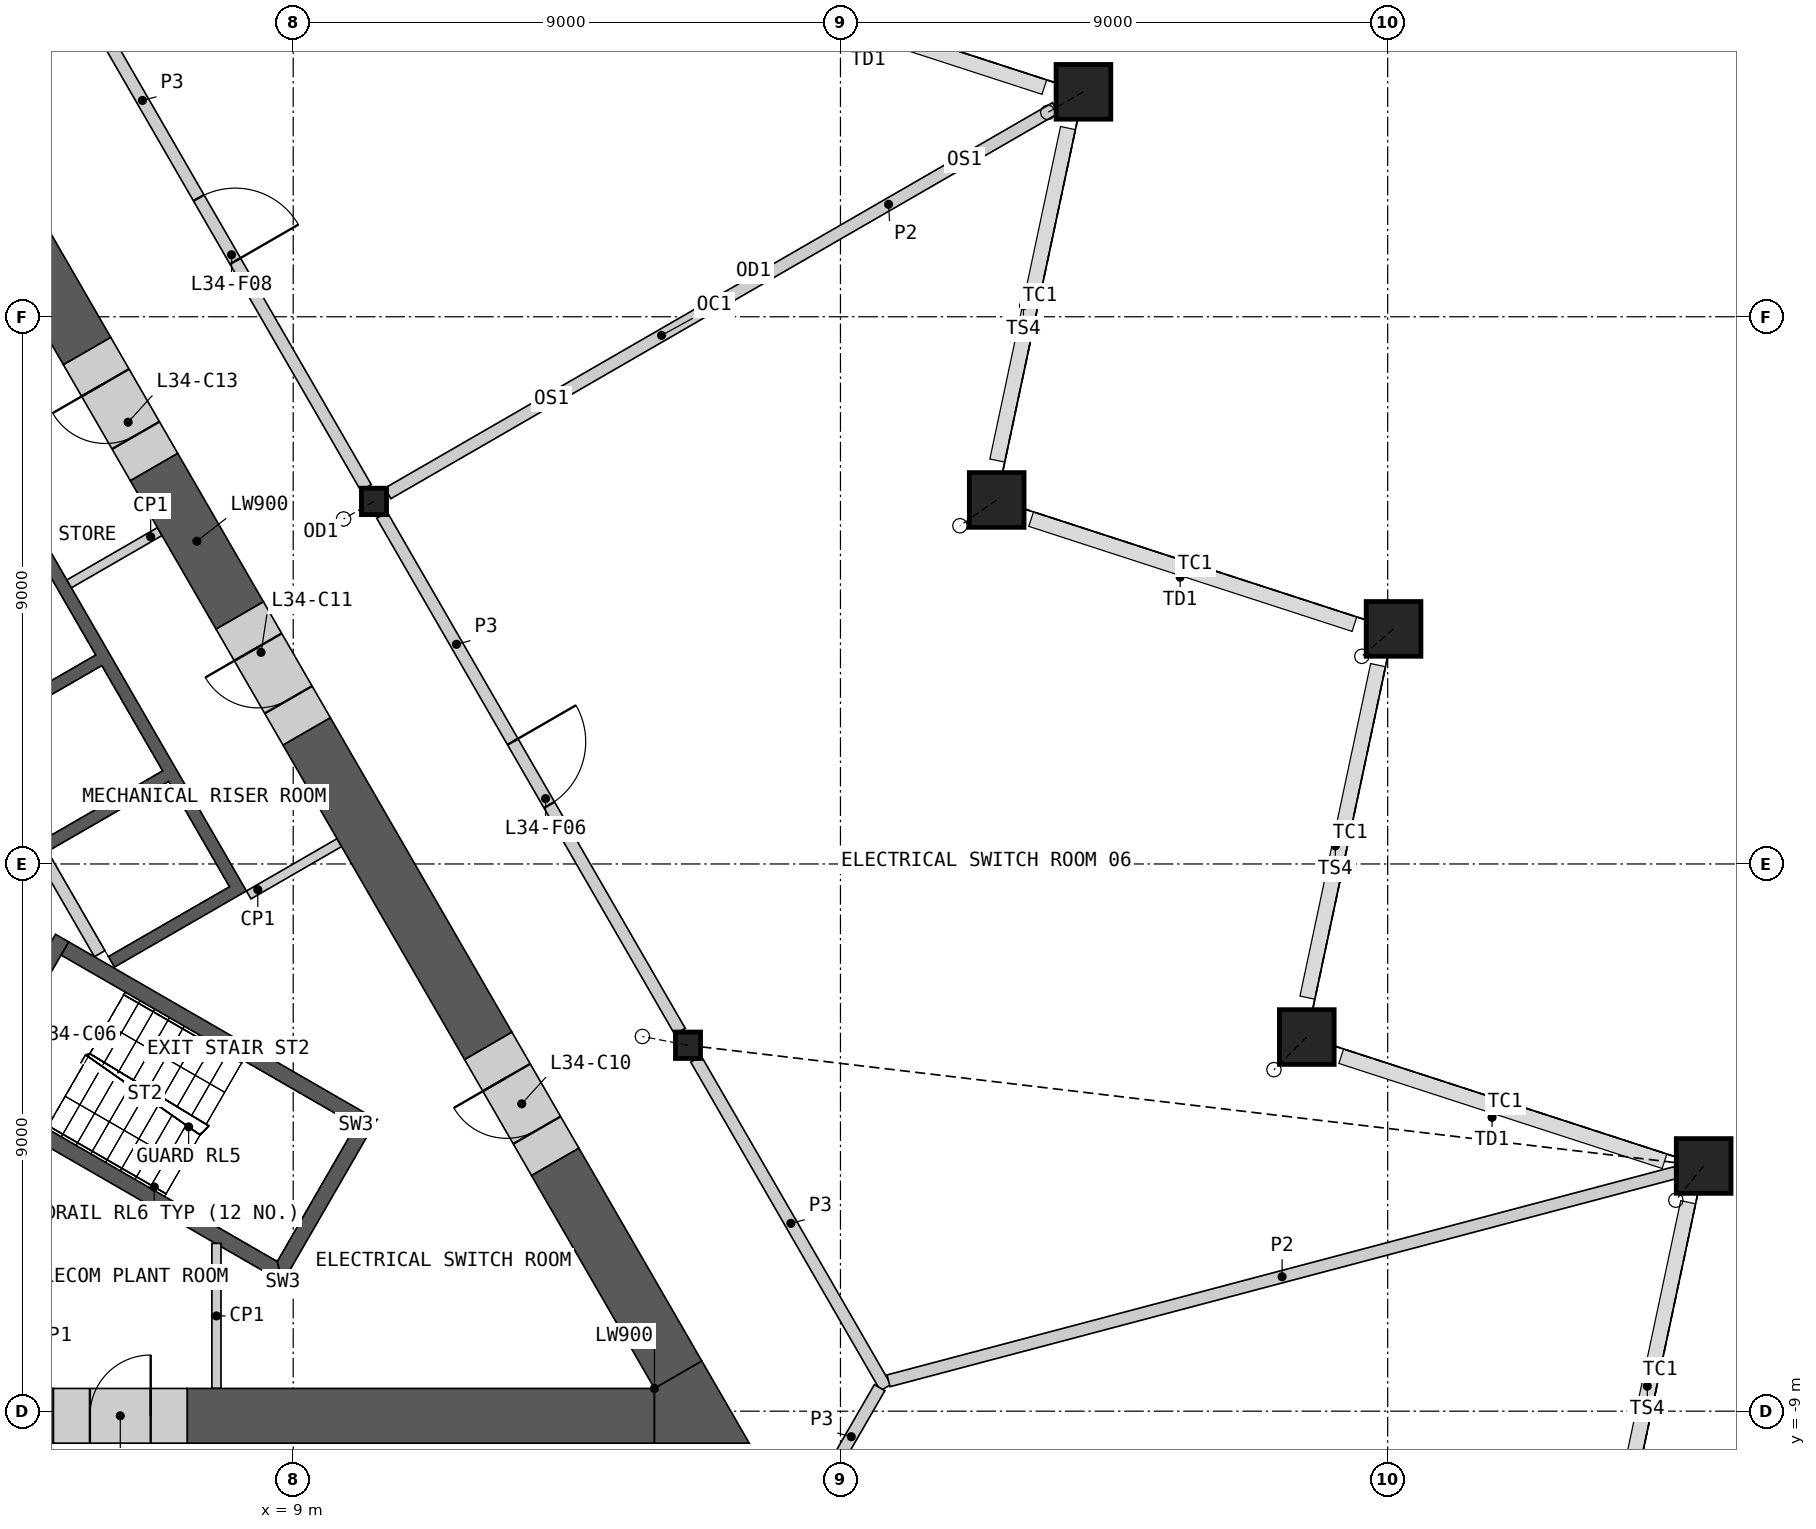
"""IFC4 building model, lengths in metres.
Left out: names, types, materials, properties, quantities, classifications, styles, units other than length and angle.
Written with IfcOpenShell. Run it as: python <this file> out.ifc"""

import sys

from ifc_helpers import new_model, si_unit, direction, frame, frame_2d, origin, origin_2d, place, context, subcontext, project, spatial, polyline, rectangle, hollow_rectangle, i_section, outline, extrude, element, fill, save


model = new_model("IFC4")
c1 = context("Model", 3, precision=1e-05, world=origin(), true_north=direction((0.0, 1.0)))
c2 = subcontext(c1, "Body", "Model", "MODEL_VIEW")
j1 = project(units=[si_unit("LENGTHUNIT", "METRE"), si_unit("PLANEANGLEUNIT", "RADIAN")], contexts=[c1])
p1 = place(None, origin())
s1 = spatial("IfcSite", under=j1, at=p1, CompositionType="ELEMENT")
p2 = place(p1, origin())
s2 = spatial("IfcBuilding", under=s1, at=p2, CompositionType="ELEMENT")
p3 = place(p2, frame((0.0, 0.0, 164.2)))
s3 = spatial("IfcBuildingStorey", under=s2, at=p3, CompositionType="ELEMENT", Elevation=164.2)
p4 = place(p3, frame((32.196, -4.967, 0.0), z_axis=(-0.090507303602, -0.111479097389, 0.989636720641), x_axis=(0.776350696847, -0.630301194276, 0.0)))
e1 = element("IfcColumn", 1, at=p4, inside=s3, PredefinedType="COLUMN", context=c2, shape_type="SweptSolid", body=[
    extrude(hollow_rectangle(XDim=0.9, YDim=0.9, WallThickness=0.06, at=origin_2d()), frame((0.0, 0.0, 0.065)), (0.0, 0.0, 1.0), 4.922),
])
p5 = place(p3, frame((25.669, -2.846, 0.0), z_axis=(-0.106777681535, -0.106053601417, 0.988610722354), x_axis=(0.70469703233, -0.709508345705, 0.0)))
e2 = element("IfcColumn", 2, at=p5, inside=s3, PredefinedType="COLUMN", context=c2, shape_type="SweptSolid", body=[
    extrude(hollow_rectangle(XDim=0.9, YDim=0.9, WallThickness=0.06, at=origin_2d()), frame((0.0, 0.0, 0.069)), (0.0, 0.0, 1.0), 4.921),
])
p6 = place(p3, frame((27.096, 3.866, 0.0), z_axis=(-0.103415089439, -0.089339415432, 0.990617881994), x_axis=(0.653730443992, -0.756727498243, 0.0)))
e3 = element("IfcColumn", 3, at=p6, inside=s3, PredefinedType="COLUMN", context=c2, shape_type="SweptSolid", body=[
    extrude(hollow_rectangle(XDim=0.9, YDim=0.9, WallThickness=0.06, at=origin_2d()), frame((0.0, 0.0, 0.062)), (0.0, 0.0, 1.0), 4.923),
])
p7 = place(p3, frame((20.57, 5.987, 0.0), z_axis=(-0.119696450413, -0.083903444055, 0.98925879922), x_axis=(0.573994494418, -0.81885915784, 0.0)))
e4 = element("IfcColumn", 4, at=p7, inside=s3, PredefinedType="COLUMN", context=c2, shape_type="SweptSolid", body=[
    extrude(hollow_rectangle(XDim=0.9, YDim=0.9, WallThickness=0.06, at=origin_2d()), frame((0.0, 0.0, 0.066)), (0.0, 0.0, 1.0), 4.921),
])
p8 = place(p3, frame((21.996, 12.699, 0.0), z_axis=(-0.116319547646, -0.067111153322, 0.990941903411), x_axis=(0.499743247872, -0.866173588957, 0.0)))
e5 = element("IfcColumn", 5, at=p8, inside=s3, PredefinedType="COLUMN", context=c2, shape_type="SweptSolid", body=[
    extrude(hollow_rectangle(XDim=0.9, YDim=0.9, WallThickness=0.06, at=origin_2d()), frame((0.0, 0.0, 0.061)), (0.0, 0.0, 1.0), 4.924),
])
p9 = place(p3, frame((15.493, -2.982, 0.0), z_axis=(-0.148279879283, 0.028574768404, 0.988532528555), x_axis=(-0.189226752312, -0.981933417401, 0.0)))
e6 = element("IfcColumn", 6, at=p9, inside=s3, PredefinedType="COLUMN", context=c2, shape_type="SweptSolid", body=[
    extrude(i_section(OverallWidth=0.412, OverallDepth=0.435, WebThickness=0.036, FlangeThickness=0.057, at=origin_2d()), frame((0.0, 0.0, 0.033)), (0.0, 0.0, 1.0), 4.992),
])
p10 = place(p3, frame((10.328, 5.963, 0.0), z_axis=(-0.099340040995, -0.057333949442, 0.993400409954), x_axis=(0.499868889286, -0.866101087359, 0.0)))
e7 = element("IfcColumn", 7, at=p10, inside=s3, PredefinedType="COLUMN", context=c2, shape_type="SweptSolid", body=[
    extrude(i_section(OverallWidth=0.412, OverallDepth=0.435, WebThickness=0.036, FlangeThickness=0.057, at=origin_2d()), frame((0.0, 0.0, 0.025)), (0.0, 0.0, 1.0), 4.983),
])
p11 = place(p3, origin())
e8 = element("IfcWall", 8, at=p11, inside=s3, PredefinedType="SHEAR", context=c2, shape_type="SweptSolid", body=[
    extrude(outline(polyline([(1.561, 6.097), (3.731, 7.35), (8.231, -0.444), (6.061, -1.697), (5.96, -1.524), (7.952, -0.374), (6.952, 1.358), (4.96, 0.208), (4.861, 0.381), (6.852, 1.531), (5.852, 3.263), (3.861, 2.113), (3.76, 2.287), (5.752, 3.437), (4.752, 5.169), (2.76, 4.019), (2.66, 4.192), (4.652, 5.342), (3.652, 7.074), (1.66, 5.924), (1.561, 6.097)])), origin(), (0.0, 0.0, 1.0), 4.65),
])
p12 = place(p3, frame((5.817, -1.476, 0.0), z_axis=(0.0, 0.0, 1.0), x_axis=(-0.500002616675, 0.866023893041, 0.0)))
e9 = element("IfcWall", 9, at=p12, inside=s3, PredefinedType="SOLIDWALL", context=c2, shape_type="SweptSolid", body=[
    extrude(rectangle(XDim=8.373, YDim=0.2, at=frame_2d((4.187, 0.0))), origin(), (0.0, 0.0, 1.0), 4.65),
])
p13 = place(p3, origin())
e10 = element("IfcWall", 10, at=p13, inside=s3, PredefinedType="SHEAR", context=c2, shape_type="SweptSolid", body=[
    extrude(outline(polyline([(3.763, -3.956), (8.83, -6.881), (8.738, -6.539), (3.888, -3.739), (3.763, -3.956)])), origin(), (0.0, 0.0, 1.0), 4.65),
])
p14 = place(p3, origin())
e11 = element("IfcWall", 11, at=p14, inside=s3, PredefinedType="SHEAR", context=c2, shape_type="SweptSolid", body=[
    extrude(outline(polyline([(8.83, -6.881), (10.374, -4.206), (10.032, -4.298), (8.738, -6.539), (8.83, -6.881)])), origin(), (0.0, 0.0, 1.0), 4.65),
])
p15 = place(p3, origin())
e12 = element("IfcWall", 12, at=p15, inside=s3, PredefinedType="SHEAR", context=c2, shape_type="SweptSolid", body=[
    extrude(outline(polyline([(10.032, -4.298), (10.374, -4.206), (5.307, -1.281), (5.182, -1.498), (10.032, -4.298)])), origin(), (0.0, 0.0, 1.0), 4.65),
])
p16 = place(p3, frame((3.655, -3.893, 0.0), z_axis=(0.0, 0.0, 1.0), x_axis=(0.499982516597, 0.866035497597, 0.0)))
e13 = element("IfcWall", 13, at=p16, inside=s3, PredefinedType="SHEAR", context=c2, shape_type="SweptSolid", body=[
    extrude(rectangle(XDim=3.088, YDim=0.25, at=frame_2d((1.544, 0.0))), origin(), (0.0, 0.0, 1.0), 4.65),
])
p17 = place(p16, frame((0.994, 0.0, 0.0)))
e14 = element("IfcOpeningElement", 14, at=p17, cuts=e13, PredefinedType="OPENING", context=c2, shape_type="SweptSolid", body=[
    extrude(rectangle(XDim=1.1, YDim=2.1, at=frame_2d((0.55, 1.05))), frame((0.0, 0.135, 0.0), z_axis=(0.0, -1.0, 0.0), x_axis=(1.0, 0.0, 0.0)), (0.0, 0.0, 1.0), 0.27),
])
for number, where, z_axis, x_axis in (
    (15, (8.268, -0.509, 0.0), (0.0, 0.0, 1.0), (0.866, 0.5, 0.0)),
    (16, (6.804, 5.467, 0.0), (0.0, 0.0, 1.0), (-0.866, -0.5, 0.0)),
):
    element("IfcWall", number, at=place(p3, frame(where, z_axis=z_axis, x_axis=x_axis)), inside=s3, PredefinedType="PARTITIONING", context=c2, shape_type="SweptSolid", body=[
        extrude(rectangle(XDim=1.72, YDim=0.15, at=frame_2d((0.86, 0.0))), origin(), (0.0, 0.0, 1.0), 4.65),
    ])
p18 = place(p3, frame((7.737, -8.626, 0.0), z_axis=(0.0, 0.0, 1.0), x_axis=(0.0, 1.0, 0.0)))
e17 = element("IfcWall", 17, at=p18, inside=s3, PredefinedType="PARTITIONING", context=c2, shape_type="SweptSolid", body=[
    extrude(rectangle(XDim=2.386, YDim=0.15, at=frame_2d((1.193, 0.0))), origin(), (0.0, 0.0, 1.0), 4.65),
])
p19 = place(p3, frame((-4.121, -9.076, 0.0), z_axis=(0.0, 0.0, 1.0), x_axis=(1.0, 0.0, 0.0)))
e18 = element("IfcWall", 18, at=p19, inside=s3, PredefinedType="SHEAR", context=c2, shape_type="SweptSolid", body=[
    extrude(rectangle(XDim=9.177, YDim=0.9, at=frame_2d((4.588, 0.0))), origin(), (0.0, 0.0, 1.0), 4.65),
])
p20 = place(p3, frame((7.256, -9.076, 0.0), z_axis=(0.0, 0.0, 1.0), x_axis=(1.0, 0.0, 0.0)))
e19 = element("IfcWall", 19, at=p20, inside=s3, PredefinedType="SHEAR", context=c2, shape_type="SweptSolid", body=[
    extrude(rectangle(XDim=7.685, YDim=0.9, at=frame_2d((3.843, 0.0))), origin(), (0.0, 0.0, 1.0), 4.65),
])
p21 = place(p3, frame((5.61, 8.435, 0.0), z_axis=(0.0, 0.0, 1.0), x_axis=(-0.500014073873, 0.866017278078, 0.0)))
e20 = element("IfcWall", 20, at=p21, inside=s3, PredefinedType="SHEAR", context=c2, shape_type="SweptSolid", body=[
    extrude(rectangle(XDim=6.329, YDim=0.9, at=frame_2d((3.165, 0.0))), origin(), (0.0, 0.0, 1.0), 4.65),
])
p22 = place(p3, frame((12.208, -2.992, 0.0), z_axis=(0.0, 0.0, 1.0), x_axis=(-0.499993658486, 0.866029065029, 0.0)))
e21 = element("IfcWall", 21, at=p22, inside=s3, PredefinedType="SHEAR", context=c2, shape_type="SweptSolid", body=[
    extrude(rectangle(XDim=5.974, YDim=0.9, at=frame_2d((2.987, 0.0))), origin(), (0.0, 0.0, 1.0), 4.65),
])
p23 = place(p3, frame((15.331, -8.401, 0.0), z_axis=(0.0, 0.0, 1.0), x_axis=(-0.499974938593, 0.866039872511, 0.0)))
e22 = element("IfcWall", 22, at=p23, inside=s3, PredefinedType="SHEAR", context=c2, shape_type="SweptSolid", body=[
    extrude(rectangle(XDim=4.046, YDim=0.9, at=frame_2d((2.023, 0.0))), origin(), (0.0, 0.0, 1.0), 4.65),
])
p24 = place(p3, frame((8.121, 4.087, 0.0), z_axis=(0.0, 0.0, 1.0), x_axis=(-0.50009448556, 0.865970845648, 0.0)))
e23 = element("IfcWall", 23, at=p24, inside=s3, PredefinedType="SHEAR", context=c2, shape_type="SweptSolid", body=[
    extrude(rectangle(XDim=2.821, YDim=0.9, at=frame_2d((1.411, 0.0))), origin(), (0.0, 0.0, 1.0), 4.65),
])
p25 = place(p3, origin())
e24 = element("IfcWall", 24, at=p25, inside=s3, PredefinedType="SHEAR", context=c2, shape_type="SweptSolid", body=[
    extrude(outline(polyline([(14.941, -8.626), (15.721, -8.176), (16.5, -9.526), (14.941, -9.526), (14.941, -8.626)])), origin(), (0.0, 0.0, 1.0), 4.65),
])
p26 = place(p3, frame((5.056, -9.076, 0.0), z_axis=(0.0, 0.0, 1.0), x_axis=(1.0, 0.0, 0.0)))
e25 = element("IfcWall", 25, at=p26, inside=s3, PredefinedType="SHEAR", context=c2, shape_type="SweptSolid", body=[
    extrude(rectangle(XDim=2.2, YDim=0.9, at=frame_2d((1.1, 0.0))), origin(), (0.0, 0.0, 1.0), 4.65),
])
p27 = place(p26, frame((0.6, 0.0, 0.0)))
e26 = element("IfcOpeningElement", 26, at=p27, cuts=e25, PredefinedType="OPENING", context=c2, shape_type="SweptSolid", body=[
    extrude(rectangle(XDim=1.0, YDim=2.1, at=frame_2d((0.5, 1.05))), frame((0.0, 0.46, 0.0), z_axis=(0.0, -1.0, 0.0), x_axis=(1.0, 0.0, 0.0)), (0.0, 0.0, 1.0), 0.92),
])
p28 = place(p3, frame((13.308, -4.898, 0.0), z_axis=(0.0, 0.0, 1.0), x_axis=(-0.50002983664, 0.866008176907, 0.0)))
e27 = element("IfcWall", 27, at=p28, inside=s3, PredefinedType="SHEAR", context=c2, shape_type="SweptSolid", body=[
    extrude(rectangle(XDim=2.2, YDim=0.9, at=frame_2d((1.1, 0.0))), origin(), (0.0, 0.0, 1.0), 4.65),
])
p29 = place(p28, frame((0.6, 0.0, 0.0)))
e28 = element("IfcOpeningElement", 28, at=p29, cuts=e27, PredefinedType="OPENING", context=c2, shape_type="SweptSolid", body=[
    extrude(rectangle(XDim=1.0, YDim=2.1, at=frame_2d((0.5, 1.05))), frame((0.0, 0.46, 0.0), z_axis=(0.0, -1.0, 0.0), x_axis=(1.0, 0.0, 0.0)), (0.0, 0.0, 1.0), 0.92),
])
p30 = place(p3, frame((9.221, 2.181, 0.0), z_axis=(0.0, 0.0, 1.0), x_axis=(-0.499946605688, 0.86605622881, 0.0)))
e29 = element("IfcWall", 29, at=p30, inside=s3, PredefinedType="SHEAR", context=c2, shape_type="SweptSolid", body=[
    extrude(rectangle(XDim=2.2, YDim=0.9, at=frame_2d((1.1, 0.0))), origin(), (0.0, 0.0, 1.0), 4.65),
])
p31 = place(p30, frame((0.6, 0.0, 0.0)))
e30 = element("IfcOpeningElement", 30, at=p31, cuts=e29, PredefinedType="OPENING", context=c2, shape_type="SweptSolid", body=[
    extrude(rectangle(XDim=1.0, YDim=2.1, at=frame_2d((0.5, 1.05))), frame((0.0, 0.46, 0.0), z_axis=(0.0, -1.0, 0.0), x_axis=(1.0, 0.0, 0.0)), (0.0, 0.0, 1.0), 0.92),
])
p32 = place(p3, frame((6.71, 6.53, 0.0), z_axis=(0.0, 0.0, 1.0), x_axis=(-0.499898558967, 0.866083962871, 0.0)))
e31 = element("IfcWall", 31, at=p32, inside=s3, PredefinedType="SHEAR", context=c2, shape_type="SweptSolid", body=[
    extrude(rectangle(XDim=2.2, YDim=0.9, at=frame_2d((1.1, 0.0))), origin(), (0.0, 0.0, 1.0), 4.65),
])
p33 = place(p32, frame((0.6, 0.0, 0.0)))
e32 = element("IfcOpeningElement", 32, at=p33, cuts=e31, PredefinedType="OPENING", context=c2, shape_type="SweptSolid", body=[
    extrude(rectangle(XDim=1.0, YDim=2.1, at=frame_2d((0.5, 1.05))), frame((0.0, 0.46, 0.0), z_axis=(0.0, -1.0, 0.0), x_axis=(1.0, 0.0, 0.0)), (0.0, 0.0, 1.0), 0.92),
])
p34 = place(p3, frame((10.46, 5.736, 0.0), z_axis=(0.0, 0.0, 1.0), x_axis=(0.500004141693, -0.866023012564, 0.0)))
e33 = element("IfcWall", 33, at=p34, inside=s3, PredefinedType="PARTITIONING", context=c2, shape_type="SweptSolid", body=[
    extrude(rectangle(XDim=9.803, YDim=0.2, at=frame_2d((4.902, 0.0))), origin(), (0.0, 0.0, 1.0), 4.65),
])
p35 = place(p34, frame((4.302, 0.0, 0.0)))
e34 = element("IfcOpeningElement", 34, at=p35, cuts=e33, PredefinedType="OPENING", context=c2, shape_type="SweptSolid", body=[
    extrude(rectangle(XDim=1.2, YDim=2.1, at=frame_2d((0.6, 1.05))), frame((0.0, 0.11, 0.0), z_axis=(0.0, -1.0, 0.0), x_axis=(1.0, 0.0, 0.0)), (0.0, 0.0, 1.0), 0.22),
])
p36 = place(p3, frame((5.295, 14.68, 0.0), z_axis=(0.0, 0.0, 1.0), x_axis=(0.500012035596, -0.866018454918, 0.0)))
e35 = element("IfcWall", 35, at=p36, inside=s3, PredefinedType="PARTITIONING", context=c2, shape_type="SweptSolid", body=[
    extrude(rectangle(XDim=9.803, YDim=0.2, at=frame_2d((4.902, 0.0))), origin(), (0.0, 0.0, 1.0), 4.65),
])
p37 = place(p36, frame((4.302, 0.0, 0.0)))
e36 = element("IfcOpeningElement", 36, at=p37, cuts=e35, PredefinedType="OPENING", context=c2, shape_type="SweptSolid", body=[
    extrude(rectangle(XDim=1.2, YDim=2.1, at=frame_2d((0.6, 1.05))), frame((0.0, 0.11, 0.0), z_axis=(0.0, -1.0, 0.0), x_axis=(1.0, 0.0, 0.0)), (0.0, 0.0, 1.0), 0.22),
])
p38 = place(p3, frame((15.624, -3.209, 0.0), z_axis=(0.0, 0.0, 1.0), x_axis=(0.499997920671, -0.866026604282, 0.0)))
e37 = element("IfcWall", 37, at=p38, inside=s3, PredefinedType="PARTITIONING", context=c2, shape_type="SweptSolid", body=[
    extrude(rectangle(XDim=6.24, YDim=0.2, at=frame_2d((3.12, 0.0))), origin(), (0.0, 0.0, 1.0), 4.65),
])
p39 = place(p3, frame((16.781, -11.84, 0.0), z_axis=(0.0, 0.0, 1.0), x_axis=(0.499958791762, 0.866049194065, 0.0)))
e38 = element("IfcWall", 38, at=p39, inside=s3, PredefinedType="PARTITIONING", context=c2, shape_type="SweptSolid", body=[
    extrude(rectangle(XDim=3.726, YDim=0.2, at=frame_2d((1.863, 0.0))), origin(), (0.0, 0.0, 1.0), 4.65),
])
p40 = place(p39, frame((0.201, 0.0, 0.0)))
e39 = element("IfcOpeningElement", 39, at=p40, cuts=e38, PredefinedType="OPENING", context=c2, shape_type="SweptSolid", body=[
    extrude(rectangle(XDim=1.2, YDim=2.1, at=frame_2d((0.6, 1.05))), frame((0.0, 0.11, 0.0), z_axis=(0.0, -1.0, 0.0), x_axis=(1.0, 0.0, 0.0)), (0.0, 0.0, 1.0), 0.22),
])
p41 = place(p3, frame((18.791, -8.501, 0.0), z_axis=(0.0, 0.0, 1.0), x_axis=(0.966727906646, 0.255806869555, 0.0)))
e40 = element("IfcWall", 40, at=p41, inside=s3, PredefinedType="PARTITIONING", context=c2, shape_type="SweptSolid", body=[
    extrude(rectangle(XDim=13.391, YDim=0.2, at=frame_2d((6.696, 0.0))), origin(), (0.0, 0.0, 1.0), 4.65),
])
p42 = place(p3, frame((10.556, 6.094, 0.0), z_axis=(0.0, 0.0, 1.0), x_axis=(0.86602461759, 0.500001361726, 0.0)))
e41 = element("IfcWall", 41, at=p42, inside=s3, PredefinedType="PARTITIONING", context=c2, shape_type="SweptSolid", body=[
    extrude(rectangle(XDim=12.679, YDim=0.2, at=frame_2d((6.34, 0.0))), origin(), (0.0, 0.0, 1.0), 4.65),
])
p43 = place(p27, origin())
e42 = element("IfcDoor", 42, at=p43, inside=s3, OperationType="SINGLE_SWING_RIGHT", PredefinedType="DOOR", context=c2, shape_type="SweptSolid", body=[
    extrude(rectangle(XDim=1.0, YDim=2.1, at=frame_2d((0.5, 1.05))), frame((0.0, 0.205, 0.0), z_axis=(0.0, -1.0, 0.0), x_axis=(1.0, 0.0, 0.0)), (0.0, 0.0, 1.0), 0.05),
])
fill(e26, e42)
p44 = place(p29, origin())
e43 = element("IfcDoor", 43, at=p44, inside=s3, OperationType="SINGLE_SWING_RIGHT", PredefinedType="DOOR", context=c2, shape_type="SweptSolid", body=[
    extrude(rectangle(XDim=1.0, YDim=2.1, at=frame_2d((0.5, 1.05))), frame((0.0, 0.205, 0.0), z_axis=(0.0, -1.0, 0.0), x_axis=(1.0, 0.0, 0.0)), (0.0, 0.0, 1.0), 0.05),
])
fill(e28, e43)
p45 = place(p31, origin())
e44 = element("IfcDoor", 44, at=p45, inside=s3, OperationType="SINGLE_SWING_RIGHT", PredefinedType="DOOR", context=c2, shape_type="SweptSolid", body=[
    extrude(rectangle(XDim=1.0, YDim=2.1, at=frame_2d((0.5, 1.05))), frame((0.0, 0.205, 0.0), z_axis=(0.0, -1.0, 0.0), x_axis=(1.0, 0.0, 0.0)), (0.0, 0.0, 1.0), 0.05),
])
fill(e30, e44)
p46 = place(p33, origin())
e45 = element("IfcDoor", 45, at=p46, inside=s3, OperationType="SINGLE_SWING_RIGHT", PredefinedType="DOOR", context=c2, shape_type="SweptSolid", body=[
    extrude(rectangle(XDim=1.0, YDim=2.1, at=frame_2d((0.5, 1.05))), frame((0.0, 0.205, 0.0), z_axis=(0.0, -1.0, 0.0), x_axis=(1.0, 0.0, 0.0)), (0.0, 0.0, 1.0), 0.05),
])
fill(e32, e45)
p47 = place(p35, origin())
e46 = element("IfcDoor", 46, at=p47, inside=s3, OperationType="SINGLE_SWING_LEFT", PredefinedType="DOOR", context=c2, shape_type="SweptSolid", body=[
    extrude(rectangle(XDim=1.2, YDim=2.1, at=frame_2d((0.6, 1.05))), frame((0.0, 0.025, 0.0), z_axis=(0.0, -1.0, 0.0), x_axis=(1.0, 0.0, 0.0)), (0.0, 0.0, 1.0), 0.05),
])
fill(e34, e46)
p48 = place(p37, origin())
e47 = element("IfcDoor", 47, at=p48, inside=s3, OperationType="SINGLE_SWING_RIGHT", PredefinedType="DOOR", context=c2, shape_type="SweptSolid", body=[
    extrude(rectangle(XDim=1.2, YDim=2.1, at=frame_2d((0.6, 1.05))), frame((0.0, 0.025, 0.0), z_axis=(0.0, -1.0, 0.0), x_axis=(1.0, 0.0, 0.0)), (0.0, 0.0, 1.0), 0.05),
])
fill(e36, e47)
save(model, sys.argv[1])
